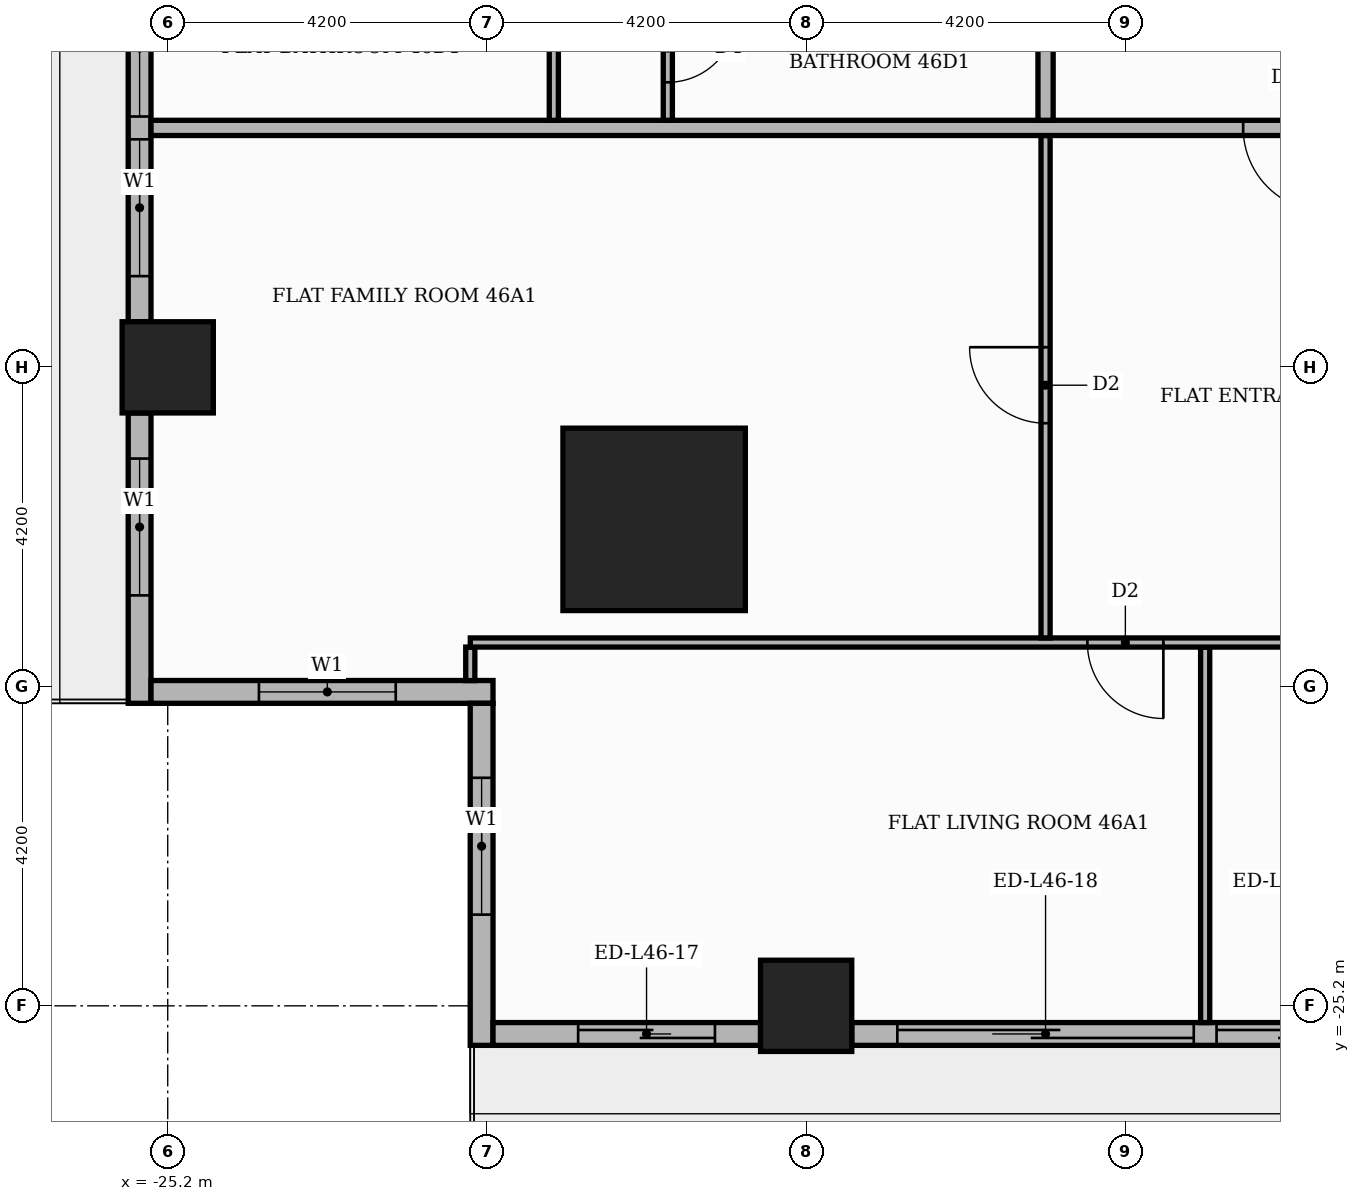
"""IFC4 building model, lengths in metres.
Left out: names, types, materials, properties, quantities, classifications, styles, units other than length and angle.
Written with IfcOpenShell. Run it as: python <this file> out.ifc"""

import sys

from ifc_helpers import new_model, si_unit, direction, frame, frame_2d, origin, origin_2d, place, context, subcontext, project, spatial, rectangle, extrude, element, fill, save


model = new_model("IFC4")
c1 = context("Model", 3, precision=1e-05, world=origin(), true_north=direction((0.0, 1.0)))
c2 = subcontext(c1, "Body", "Model", "MODEL_VIEW")
j1 = project(units=[si_unit("LENGTHUNIT", "METRE"), si_unit("PLANEANGLEUNIT", "RADIAN")], contexts=[c1])
p1 = place(None, origin())
s1 = spatial("IfcSite", under=j1, at=p1, CompositionType="ELEMENT")
p2 = place(p1, origin())
s2 = spatial("IfcBuilding", under=s1, at=p2, CompositionType="ELEMENT")
p3 = place(p2, frame((0.0, 0.0, 196.2)))
s3 = spatial("IfcBuildingStorey", under=s2, at=p3, CompositionType="ELEMENT", Elevation=196.2)
p4 = place(p3, frame((-18.8, -18.8, 0.0), z_axis=(0.0, 0.0, 1.0), x_axis=(1.0, 0.0, 0.0)))
e1 = element("IfcColumn", 1, at=p4, inside=s3, PredefinedType="COLUMN", context=c2, shape_type="SweptSolid", body=[
    extrude(rectangle(XDim=2.4, YDim=2.4, at=origin_2d()), origin(), (0.0, 0.0, 1.0), 3.9),
])
for number, where, z_axis, x_axis in (
    (2, (-16.8, -25.2, 0.0), (0.0, 0.0, 1.0), (1.0, 0.0, 0.0)),
    (3, (-25.2, -16.8, 0.0), (0.0, 0.0, 1.0), (1.0, 0.0, 0.0)),
):
    element("IfcColumn", number, at=place(p3, frame(where, z_axis=z_axis, x_axis=x_axis)), inside=s3, PredefinedType="COLUMN", context=c2, shape_type="SweptSolid", body=[
        extrude(rectangle(XDim=1.2, YDim=1.2, at=origin_2d()), origin(), (0.0, 0.0, 1.0), 3.9),
    ])
p5 = place(p3, frame((-25.57, -9.0, 0.0), z_axis=(0.0, 0.0, 1.0), x_axis=(0.0, -1.0, 0.0)))
e4 = element("IfcWall", 4, at=p5, inside=s3, PredefinedType="STANDARD", context=c2, shape_type="SweptSolid", body=[
    extrude(rectangle(XDim=7.2, YDim=0.3, at=frame_2d((3.6, 0.0))), origin(), (0.0, 0.0, 1.0), 3.48),
])
p6 = place(p5, frame((0.6, 0.0, 0.9)))
e5 = element("IfcOpeningElement", 5, at=p6, cuts=e4, PredefinedType="OPENING", context=c2, shape_type="SweptSolid", body=[
    extrude(rectangle(XDim=1.8, YDim=2.1, at=frame_2d((0.9, 1.05))), frame((0.0, 0.16, 0.0), z_axis=(0.0, -1.0, 0.0), x_axis=(1.0, 0.0, 0.0)), (0.0, 0.0, 1.0), 0.32),
])
p7 = place(p5, frame((2.7, 0.0, 0.9)))
e6 = element("IfcOpeningElement", 6, at=p7, cuts=e4, PredefinedType="OPENING", context=c2, shape_type="SweptSolid", body=[
    extrude(rectangle(XDim=1.8, YDim=2.1, at=frame_2d((0.9, 1.05))), frame((0.0, 0.16, 0.0), z_axis=(0.0, -1.0, 0.0), x_axis=(1.0, 0.0, 0.0)), (0.0, 0.0, 1.0), 0.32),
])
p8 = place(p5, frame((4.8, 0.0, 0.9)))
e7 = element("IfcOpeningElement", 7, at=p8, cuts=e4, PredefinedType="OPENING", context=c2, shape_type="SweptSolid", body=[
    extrude(rectangle(XDim=1.8, YDim=2.1, at=frame_2d((0.9, 1.05))), frame((0.0, 0.16, 0.0), z_axis=(0.0, -1.0, 0.0), x_axis=(1.0, 0.0, 0.0)), (0.0, 0.0, 1.0), 0.32),
])
p9 = place(p3, frame((-25.57, -17.4, 0.0), z_axis=(0.0, 0.0, 1.0), x_axis=(0.0, -1.0, 0.0)))
e8 = element("IfcWall", 8, at=p9, inside=s3, PredefinedType="STANDARD", context=c2, shape_type="SweptSolid", body=[
    extrude(rectangle(XDim=3.82, YDim=0.3, at=frame_2d((1.91, 0.0))), origin(), (0.0, 0.0, 1.0), 3.48),
])
p10 = place(p9, frame((0.6, 0.0, 0.9)))
e9 = element("IfcOpeningElement", 9, at=p10, cuts=e8, PredefinedType="OPENING", context=c2, shape_type="SweptSolid", body=[
    extrude(rectangle(XDim=1.8, YDim=2.1, at=frame_2d((0.9, 1.05))), frame((0.0, 0.16, 0.0), z_axis=(0.0, -1.0, 0.0), x_axis=(1.0, 0.0, 0.0)), (0.0, 0.0, 1.0), 0.32),
])
p11 = place(p3, frame((-25.42, -21.07, 0.0), z_axis=(0.0, 0.0, 1.0), x_axis=(1.0, 0.0, 0.0)))
e10 = element("IfcWall", 10, at=p11, inside=s3, PredefinedType="STANDARD", context=c2, shape_type="SweptSolid", body=[
    extrude(rectangle(XDim=4.5, YDim=0.3, at=frame_2d((2.25, 0.0))), origin(), (0.0, 0.0, 1.0), 3.48),
])
p12 = place(p11, frame((1.42, 0.0, 0.9)))
e11 = element("IfcOpeningElement", 11, at=p12, cuts=e10, PredefinedType="OPENING", context=c2, shape_type="SweptSolid", body=[
    extrude(rectangle(XDim=1.8, YDim=2.1, at=frame_2d((0.9, 1.05))), frame((0.0, 0.16, 0.0), z_axis=(0.0, -1.0, 0.0), x_axis=(1.0, 0.0, 0.0)), (0.0, 0.0, 1.0), 0.32),
])
p13 = place(p3, frame((-21.07, -21.22, 0.0), z_axis=(0.0, 0.0, 1.0), x_axis=(0.0, -1.0, 0.0)))
e12 = element("IfcWall", 12, at=p13, inside=s3, PredefinedType="STANDARD", context=c2, shape_type="SweptSolid", body=[
    extrude(rectangle(XDim=4.5, YDim=0.3, at=frame_2d((2.25, 0.0))), origin(), (0.0, 0.0, 1.0), 3.48),
])
p14 = place(p13, frame((0.98, 0.0, 0.9)))
e13 = element("IfcOpeningElement", 13, at=p14, cuts=e12, PredefinedType="OPENING", context=c2, shape_type="SweptSolid", body=[
    extrude(rectangle(XDim=1.8, YDim=2.1, at=frame_2d((0.9, 1.05))), frame((0.0, 0.16, 0.0), z_axis=(0.0, -1.0, 0.0), x_axis=(1.0, 0.0, 0.0)), (0.0, 0.0, 1.0), 0.32),
])
p15 = place(p3, frame((-20.92, -25.57, 0.0), z_axis=(0.0, 0.0, 1.0), x_axis=(1.0, 0.0, 0.0)))
e14 = element("IfcWall", 14, at=p15, inside=s3, PredefinedType="STANDARD", context=c2, shape_type="SweptSolid", body=[
    extrude(rectangle(XDim=3.52, YDim=0.3, at=frame_2d((1.76, 0.0))), origin(), (0.0, 0.0, 1.0), 3.48),
])
p16 = place(p15, frame((1.12, 0.0, 0.0)))
e15 = element("IfcOpeningElement", 15, at=p16, cuts=e14, PredefinedType="OPENING", context=c2, shape_type="SweptSolid", body=[
    extrude(rectangle(XDim=1.8, YDim=2.4, at=frame_2d((0.9, 1.2))), frame((0.0, 0.16, 0.0), z_axis=(0.0, -1.0, 0.0), x_axis=(1.0, 0.0, 0.0)), (0.0, 0.0, 1.0), 0.32),
])
p17 = place(p3, frame((-16.2, -25.57, 0.0), z_axis=(0.0, 0.0, 1.0), x_axis=(1.0, 0.0, 0.0)))
e16 = element("IfcWall", 16, at=p17, inside=s3, PredefinedType="STANDARD", context=c2, shape_type="SweptSolid", body=[
    extrude(rectangle(XDim=7.2, YDim=0.3, at=frame_2d((3.6, 0.0))), origin(), (0.0, 0.0, 1.0), 3.48),
])
p18 = place(p17, frame((0.6, 0.0, 0.0)))
e17 = element("IfcOpeningElement", 17, at=p18, cuts=e16, PredefinedType="OPENING", context=c2, shape_type="SweptSolid", body=[
    extrude(rectangle(XDim=3.9, YDim=2.4, at=frame_2d((1.95, 1.2))), frame((0.0, 0.16, 0.0), z_axis=(0.0, -1.0, 0.0), x_axis=(1.0, 0.0, 0.0)), (0.0, 0.0, 1.0), 0.32),
])
p19 = place(p17, frame((4.8, 0.0, 0.0)))
e18 = element("IfcOpeningElement", 18, at=p19, cuts=e16, PredefinedType="OPENING", context=c2, shape_type="SweptSolid", body=[
    extrude(rectangle(XDim=1.8, YDim=2.4, at=frame_2d((0.9, 1.2))), frame((0.0, 0.16, 0.0), z_axis=(0.0, -1.0, 0.0), x_axis=(1.0, 0.0, 0.0)), (0.0, 0.0, 1.0), 0.32),
])
p20 = place(p3, frame((-11.55, -25.42, 0.0), z_axis=(0.0, 0.0, 1.0), x_axis=(0.0, 1.0, 0.0)))
e19 = element("IfcWall", 19, at=p20, inside=s3, PredefinedType="PARTITIONING", context=c2, shape_type="SweptSolid", body=[
    extrude(rectangle(XDim=4.94, YDim=0.12, at=frame_2d((2.47, 0.0))), origin(), (0.0, 0.0, 1.0), 3.48),
])
p21 = place(p3, frame((-21.219, -20.921, 0.0), z_axis=(0.0, 0.0, 1.0), x_axis=(0.0, 1.0, 0.0)))
e20 = element("IfcWall", 20, at=p21, inside=s3, PredefinedType="PARTITIONING", context=c2, shape_type="SweptSolid", body=[
    extrude(rectangle(XDim=0.441, YDim=0.12, at=frame_2d((0.22, 0.0))), origin(), (0.0, 0.0, 1.0), 3.48),
])
p22 = place(p3, frame((-21.219, -20.42, 0.0), z_axis=(0.0, 0.0, 1.0), x_axis=(1.0, 0.0, 0.0)))
e21 = element("IfcWall", 21, at=p22, inside=s3, PredefinedType="PARTITIONING", context=c2, shape_type="SweptSolid", body=[
    extrude(rectangle(XDim=34.769, YDim=0.12, at=frame_2d((17.385, 0.0))), origin(), (0.0, 0.0, 1.0), 3.48),
])
p23 = place(p22, frame((8.119, 0.0, 0.0)))
e22 = element("IfcOpeningElement", 22, at=p23, cuts=e21, PredefinedType="OPENING", context=c2, shape_type="SweptSolid", body=[
    extrude(rectangle(XDim=1.0, YDim=2.1, at=frame_2d((0.5, 1.05))), frame((0.0, 0.07, 0.0), z_axis=(0.0, -1.0, 0.0), x_axis=(1.0, 0.0, 0.0)), (0.0, 0.0, 1.0), 0.14),
])
p24 = place(p22, frame((13.419, 0.0, 0.0)))
e23 = element("IfcOpeningElement", 23, at=p24, cuts=e21, PredefinedType="OPENING", context=c2, shape_type="SweptSolid", body=[
    extrude(rectangle(XDim=0.9, YDim=2.1, at=frame_2d((0.45, 1.05))), frame((0.0, 0.07, 0.0), z_axis=(0.0, -1.0, 0.0), x_axis=(1.0, 0.0, 0.0)), (0.0, 0.0, 1.0), 0.14),
])
p25 = place(p22, frame((23.919, 0.0, 0.0)))
e24 = element("IfcOpeningElement", 24, at=p25, cuts=e21, PredefinedType="OPENING", context=c2, shape_type="SweptSolid", body=[
    extrude(rectangle(XDim=0.9, YDim=2.1, at=frame_2d((0.45, 1.05))), frame((0.0, 0.07, 0.0), z_axis=(0.0, -1.0, 0.0), x_axis=(1.0, 0.0, 0.0)), (0.0, 0.0, 1.0), 0.14),
])
p26 = place(p22, frame((31.269, 0.0, 0.0)))
e25 = element("IfcOpeningElement", 25, at=p26, cuts=e21, PredefinedType="OPENING", context=c2, shape_type="SweptSolid", body=[
    extrude(rectangle(XDim=0.9, YDim=2.1, at=frame_2d((0.45, 1.05))), frame((0.0, 0.07, 0.0), z_axis=(0.0, -1.0, 0.0), x_axis=(1.0, 0.0, 0.0)), (0.0, 0.0, 1.0), 0.14),
])
p27 = place(p3, frame((-13.65, -20.36, 0.0), z_axis=(0.0, 0.0, 1.0), x_axis=(0.0, 1.0, 0.0)))
e26 = element("IfcWall", 26, at=p27, inside=s3, PredefinedType="PARTITIONING", context=c2, shape_type="SweptSolid", body=[
    extrude(rectangle(XDim=6.61, YDim=0.12, at=frame_2d((3.305, 0.0))), origin(), (0.0, 0.0, 1.0), 3.48),
])
p28 = place(p27, frame((2.825, 0.0, 0.0)))
e27 = element("IfcOpeningElement", 27, at=p28, cuts=e26, PredefinedType="OPENING", context=c2, shape_type="SweptSolid", body=[
    extrude(rectangle(XDim=1.0, YDim=2.1, at=frame_2d((0.5, 1.05))), frame((0.0, 0.07, 0.0), z_axis=(0.0, -1.0, 0.0), x_axis=(1.0, 0.0, 0.0)), (0.0, 0.0, 1.0), 0.14),
])
p29 = place(p3, frame((-25.42, -13.65, 0.0), z_axis=(0.0, 0.0, 1.0), x_axis=(1.0, 0.0, 0.0)))
e28 = element("IfcWall", 28, at=p29, inside=s3, PredefinedType="PARTITIONING", context=c2, shape_type="SweptSolid", body=[
    extrude(rectangle(XDim=39.07, YDim=0.2, at=frame_2d((19.535, 0.0))), origin(), (0.0, 0.0, 1.0), 3.48),
])
p30 = place(p29, frame((14.37, 0.0, 0.0)))
e29 = element("IfcOpeningElement", 29, at=p30, cuts=e28, PredefinedType="OPENING", context=c2, shape_type="SweptSolid", body=[
    extrude(rectangle(XDim=1.1, YDim=2.4, at=frame_2d((0.55, 1.2))), frame((0.0, 0.11, 0.0), z_axis=(0.0, -1.0, 0.0), x_axis=(1.0, 0.0, 0.0)), (0.0, 0.0, 1.0), 0.22),
])
p31 = place(p3, frame((-20.12, -13.55, 0.0), z_axis=(0.0, 0.0, 1.0), x_axis=(0.0, 1.0, 0.0)))
e30 = element("IfcWall", 30, at=p31, inside=s3, PredefinedType="PARTITIONING", context=c2, shape_type="SweptSolid", body=[
    extrude(rectangle(XDim=1.94, YDim=0.12, at=frame_2d((0.97, 0.0))), origin(), (0.0, 0.0, 1.0), 3.48),
])
p32 = place(p3, frame((-18.62, -13.55, 0.0), z_axis=(0.0, 0.0, 1.0), x_axis=(0.0, 1.0, 0.0)))
e31 = element("IfcWall", 31, at=p32, inside=s3, PredefinedType="PARTITIONING", context=c2, shape_type="SweptSolid", body=[
    extrude(rectangle(XDim=1.94, YDim=0.12, at=frame_2d((0.97, 0.0))), origin(), (0.0, 0.0, 1.0), 3.48),
])
p33 = place(p32, frame((0.5, 0.0, 0.0)))
e32 = element("IfcOpeningElement", 32, at=p33, cuts=e31, PredefinedType="OPENING", context=c2, shape_type="SweptSolid", body=[
    extrude(rectangle(XDim=0.9, YDim=2.1, at=frame_2d((0.45, 1.05))), frame((0.0, 0.07, 0.0), z_axis=(0.0, -1.0, 0.0), x_axis=(1.0, 0.0, 0.0)), (0.0, 0.0, 1.0), 0.14),
])
p34 = place(p3, frame((-13.65, -13.55, 0.0), z_axis=(0.0, 0.0, 1.0), x_axis=(0.0, 1.0, 0.0)))
e33 = element("IfcWall", 33, at=p34, inside=s3, PredefinedType="PARTITIONING", context=c2, shape_type="SweptSolid", body=[
    extrude(rectangle(XDim=27.1, YDim=0.2, at=frame_2d((13.55, 0.0))), origin(), (0.0, 0.0, 1.0), 3.48),
])
p35 = place(p34, frame((23.5, 0.0, 0.0)))
e34 = element("IfcOpeningElement", 34, at=p35, cuts=e33, PredefinedType="OPENING", context=c2, shape_type="SweptSolid", body=[
    extrude(rectangle(XDim=1.1, YDim=2.4, at=frame_2d((0.55, 1.2))), frame((0.0, 0.11, 0.0), z_axis=(0.0, -1.0, 0.0), x_axis=(1.0, 0.0, 0.0)), (0.0, 0.0, 1.0), 0.22),
])
p36 = place(p7, origin())
e35 = element("IfcWindow", 35, at=p36, inside=s3, PartitioningType="SINGLE_PANEL", PredefinedType="WINDOW", context=c2, shape_type="SweptSolid", body=[
    extrude(rectangle(XDim=1.8, YDim=2.1, at=frame_2d((0.9, 1.05))), frame((0.0, 0.03, 0.0), z_axis=(0.0, -1.0, 0.0), x_axis=(1.0, 0.0, 0.0)), (0.0, 0.0, 1.0), 0.06),
])
fill(e6, e35)
p37 = place(p8, origin())
e36 = element("IfcWindow", 36, at=p37, inside=s3, PartitioningType="SINGLE_PANEL", PredefinedType="WINDOW", context=c2, shape_type="SweptSolid", body=[
    extrude(rectangle(XDim=1.8, YDim=2.1, at=frame_2d((0.9, 1.05))), frame((0.0, 0.03, 0.0), z_axis=(0.0, -1.0, 0.0), x_axis=(1.0, 0.0, 0.0)), (0.0, 0.0, 1.0), 0.06),
])
fill(e7, e36)
p38 = place(p10, origin())
e37 = element("IfcWindow", 37, at=p38, inside=s3, PartitioningType="SINGLE_PANEL", PredefinedType="WINDOW", context=c2, shape_type="SweptSolid", body=[
    extrude(rectangle(XDim=1.8, YDim=2.1, at=frame_2d((0.9, 1.05))), frame((0.0, 0.03, 0.0), z_axis=(0.0, -1.0, 0.0), x_axis=(1.0, 0.0, 0.0)), (0.0, 0.0, 1.0), 0.06),
])
fill(e9, e37)
p39 = place(p12, origin())
e38 = element("IfcWindow", 38, at=p39, inside=s3, PartitioningType="SINGLE_PANEL", PredefinedType="WINDOW", context=c2, shape_type="SweptSolid", body=[
    extrude(rectangle(XDim=1.8, YDim=2.1, at=frame_2d((0.9, 1.05))), frame((0.0, 0.03, 0.0), z_axis=(0.0, -1.0, 0.0), x_axis=(1.0, 0.0, 0.0)), (0.0, 0.0, 1.0), 0.06),
])
fill(e11, e38)
p40 = place(p14, origin())
e39 = element("IfcWindow", 39, at=p40, inside=s3, PartitioningType="SINGLE_PANEL", PredefinedType="WINDOW", context=c2, shape_type="SweptSolid", body=[
    extrude(rectangle(XDim=1.8, YDim=2.1, at=frame_2d((0.9, 1.05))), frame((0.0, 0.03, 0.0), z_axis=(0.0, -1.0, 0.0), x_axis=(1.0, 0.0, 0.0)), (0.0, 0.0, 1.0), 0.06),
])
fill(e13, e39)
p41 = place(p16, origin())
e40 = element("IfcDoor", 40, at=p41, inside=s3, OperationType="SLIDING_TO_RIGHT", PredefinedType="DOOR", context=c2, shape_type="SweptSolid", body=[
    extrude(rectangle(XDim=1.8, YDim=2.4, at=frame_2d((0.9, 1.2))), frame((0.0, 0.025, 0.0), z_axis=(0.0, -1.0, 0.0), x_axis=(1.0, 0.0, 0.0)), (0.0, 0.0, 1.0), 0.05),
])
fill(e15, e40)
p42 = place(p18, origin())
e41 = element("IfcDoor", 41, at=p42, inside=s3, OperationType="SLIDING_TO_LEFT", PredefinedType="DOOR", context=c2, shape_type="SweptSolid", body=[
    extrude(rectangle(XDim=3.9, YDim=2.4, at=frame_2d((1.95, 1.2))), frame((0.0, 0.025, 0.0), z_axis=(0.0, -1.0, 0.0), x_axis=(1.0, 0.0, 0.0)), (0.0, 0.0, 1.0), 0.05),
])
fill(e17, e41)
p43 = place(p19, origin())
e42 = element("IfcDoor", 42, at=p43, inside=s3, OperationType="SLIDING_TO_RIGHT", PredefinedType="DOOR", context=c2, shape_type="SweptSolid", body=[
    extrude(rectangle(XDim=1.8, YDim=2.4, at=frame_2d((0.9, 1.2))), frame((0.0, 0.025, 0.0), z_axis=(0.0, -1.0, 0.0), x_axis=(1.0, 0.0, 0.0)), (0.0, 0.0, 1.0), 0.05),
])
fill(e18, e42)
p44 = place(p30, frame((1.1, 0.0, 0.0), z_axis=(0.0, 0.0, 1.0), x_axis=(-1.0, 0.0, 0.0)))
e43 = element("IfcDoor", 43, at=p44, inside=s3, OperationType="SINGLE_SWING_RIGHT", PredefinedType="DOOR", context=c2, shape_type="SweptSolid", body=[
    extrude(rectangle(XDim=1.1, YDim=2.4, at=frame_2d((0.55, 1.2))), frame((0.0, 0.025, 0.0), z_axis=(0.0, -1.0, 0.0), x_axis=(1.0, 0.0, 0.0)), (0.0, 0.0, 1.0), 0.05),
])
fill(e29, e43)
p45 = place(p28, origin())
e44 = element("IfcDoor", 44, at=p45, inside=s3, OperationType="SINGLE_SWING_RIGHT", PredefinedType="DOOR", context=c2, shape_type="SweptSolid", body=[
    extrude(rectangle(XDim=1.0, YDim=2.1, at=frame_2d((0.5, 1.05))), frame((0.0, 0.025, 0.0), z_axis=(0.0, -1.0, 0.0), x_axis=(1.0, 0.0, 0.0)), (0.0, 0.0, 1.0), 0.05),
])
fill(e27, e44)
p46 = place(p23, frame((1.0, 0.0, 0.0), z_axis=(0.0, 0.0, 1.0), x_axis=(-1.0, 0.0, 0.0)))
e45 = element("IfcDoor", 45, at=p46, inside=s3, OperationType="SINGLE_SWING_RIGHT", PredefinedType="DOOR", context=c2, shape_type="SweptSolid", body=[
    extrude(rectangle(XDim=1.0, YDim=2.1, at=frame_2d((0.5, 1.05))), frame((0.0, 0.025, 0.0), z_axis=(0.0, -1.0, 0.0), x_axis=(1.0, 0.0, 0.0)), (0.0, 0.0, 1.0), 0.05),
])
fill(e22, e45)
p47 = place(p33, frame((0.9, 0.0, 0.0), z_axis=(0.0, 0.0, 1.0), x_axis=(-1.0, 0.0, 0.0)))
e46 = element("IfcDoor", 46, at=p47, inside=s3, OperationType="SINGLE_SWING_RIGHT", PredefinedType="DOOR", context=c2, shape_type="SweptSolid", body=[
    extrude(rectangle(XDim=0.9, YDim=2.1, at=frame_2d((0.45, 1.05))), frame((0.0, 0.025, 0.0), z_axis=(0.0, -1.0, 0.0), x_axis=(1.0, 0.0, 0.0)), (0.0, 0.0, 1.0), 0.05),
])
fill(e32, e46)
save(model, sys.argv[1])
